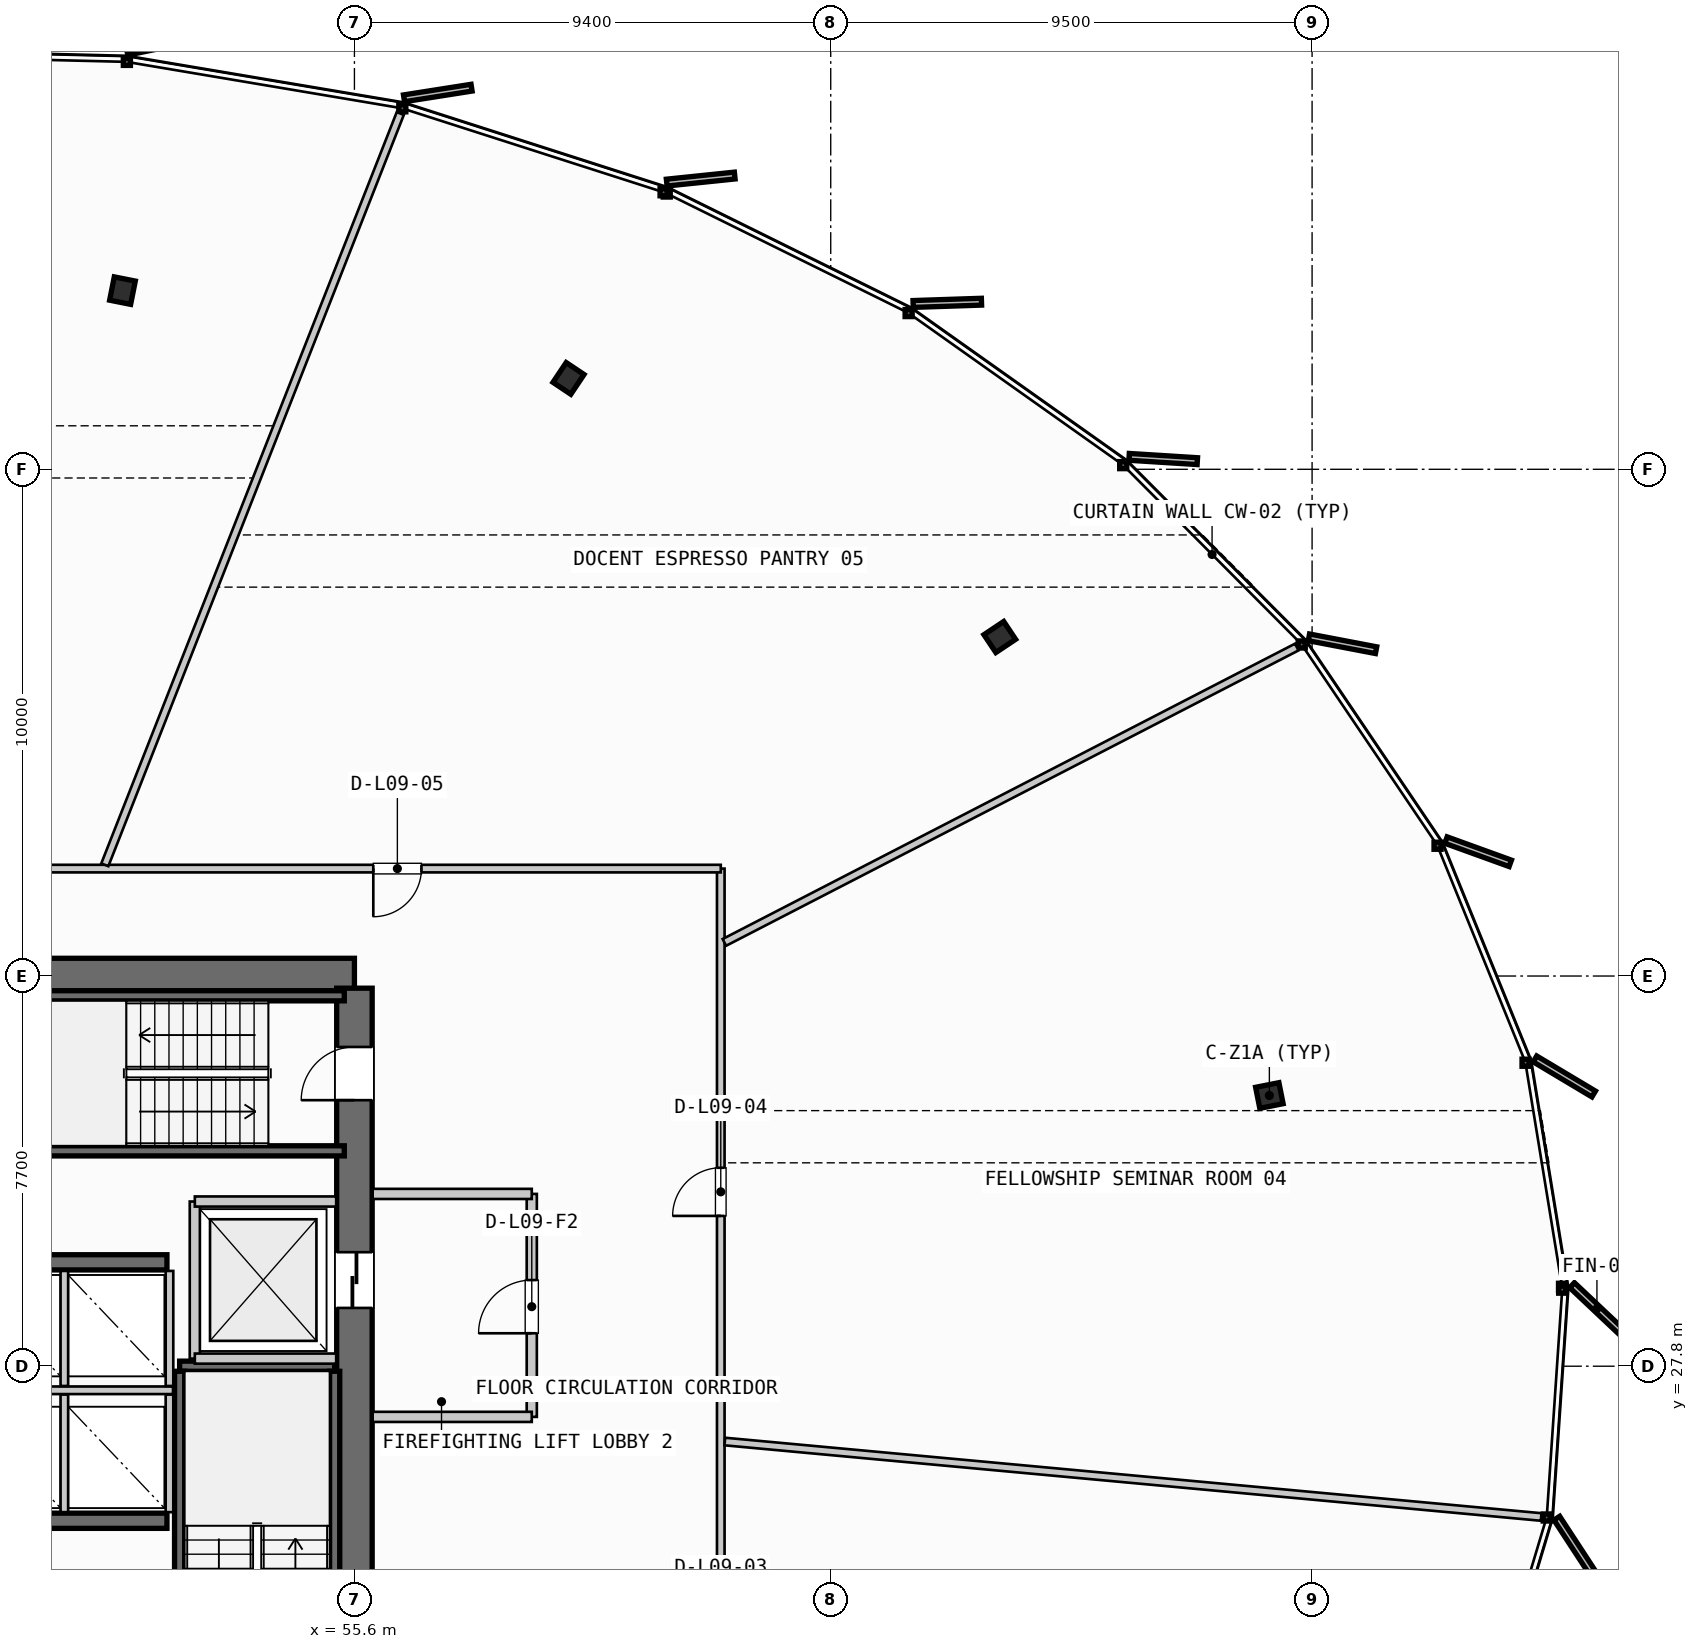
"""IFC4 building model, lengths in metres.
Left out: names, types, materials, properties, quantities, classifications, styles, units other than length and angle.
Written with IfcOpenShell. Run it as: python <this file> out.ifc"""

import sys

from ifc_helpers import new_model, si_unit, direction, frame, frame_2d, origin, origin_2d, place, context, subcontext, project, spatial, rectangle, i_section, extrude, source, transform, mapped, element, fill, save


model = new_model("IFC4")
c1 = context("Model", 3, precision=1e-05, world=origin(), true_north=direction((0.0, 1.0)))
c2 = subcontext(c1, "Body", "Model", "MODEL_VIEW")
j1 = project(units=[si_unit("LENGTHUNIT", "METRE"), si_unit("PLANEANGLEUNIT", "RADIAN")], contexts=[c1])
p1 = place(None, origin())
s1 = spatial("IfcSite", under=j1, at=p1, CompositionType="ELEMENT")
p2 = place(p1, origin())
s2 = spatial("IfcBuilding", under=s1, at=p2, CompositionType="ELEMENT")
p3 = place(p2, frame((0.0, 0.0, 41.0)))
s3 = spatial("IfcBuildingStorey", under=s2, at=p3, CompositionType="ELEMENT", Elevation=41.0)
p4 = place(p3, frame((55.6, 35.5, 0.0), z_axis=(0.0, 0.0, 1.0), x_axis=(-1.0, 0.0, 0.0)))
e1 = element("IfcWall", 1, at=p4, inside=s3, PredefinedType="SHEAR", context=c2, shape_type="SweptSolid", body=[
    extrude(rectangle(XDim=17.6, YDim=0.7, at=frame_2d((8.8, 0.0))), origin(), (0.0, 0.0, 1.0), 3.55),
])
p5 = place(p4, frame((8.05, 0.0, 0.0)))
e2 = element("IfcOpeningElement", 2, at=p5, cuts=e1, PredefinedType="OPENING", context=c2, shape_type="SweptSolid", body=[
    extrude(rectangle(XDim=1.5, YDim=2.2, at=frame_2d((0.75, 1.1))), frame((0.0, 0.36, 0.0), z_axis=(0.0, -1.0, 0.0), x_axis=(1.0, 0.0, 0.0)), (0.0, 0.0, 1.0), 0.72),
])
p6 = place(p4, frame((14.95, 0.0, 0.0)))
e3 = element("IfcOpeningElement", 3, at=p6, cuts=e1, PredefinedType="OPENING", context=c2, shape_type="SweptSolid", body=[
    extrude(rectangle(XDim=1.4, YDim=2.3, at=frame_2d((0.7, 1.15))), frame((0.0, 0.36, 0.0), z_axis=(0.0, -1.0, 0.0), x_axis=(1.0, 0.0, 0.0)), (0.0, 0.0, 1.0), 0.72),
])
p7 = place(p4, frame((12.9, 0.0, 0.0)))
e4 = element("IfcOpeningElement", 4, at=p7, cuts=e1, PredefinedType="OPENING", context=c2, shape_type="SweptSolid", body=[
    extrude(rectangle(XDim=0.9, YDim=2.15, at=frame_2d((0.45, 1.075))), frame((0.0, 0.36, 0.0), z_axis=(0.0, -1.0, 0.0), x_axis=(1.0, 0.0, 0.0)), (0.0, 0.0, 1.0), 0.72),
])
p8 = place(p4, frame((10.6, 0.0, 0.0)))
e5 = element("IfcOpeningElement", 5, at=p8, cuts=e1, PredefinedType="OPENING", context=c2, shape_type="SweptSolid", body=[
    extrude(rectangle(XDim=0.95, YDim=2.15, at=frame_2d((0.475, 1.075))), frame((0.0, 0.36, 0.0), z_axis=(0.0, -1.0, 0.0), x_axis=(1.0, 0.0, 0.0)), (0.0, 0.0, 1.0), 0.72),
])
p9 = place(p3, frame((55.6, 20.34, 0.0), z_axis=(0.0, 0.0, 1.0), x_axis=(0.0, 1.0, 0.0)))
e6 = element("IfcWall", 6, at=p9, inside=s3, PredefinedType="SHEAR", context=c2, shape_type="SweptSolid", body=[
    extrude(rectangle(XDim=14.92, YDim=0.7, at=frame_2d((7.46, 0.0))), origin(), (0.0, 0.0, 1.0), 3.55),
])
p10 = place(p9, frame((12.71, 0.0, 0.0)))
e7 = element("IfcOpeningElement", 7, at=p10, cuts=e6, PredefinedType="OPENING", context=c2, shape_type="SweptSolid", body=[
    extrude(rectangle(XDim=1.05, YDim=2.15, at=frame_2d((0.525, 1.075))), frame((0.0, 0.36, 0.0), z_axis=(0.0, -1.0, 0.0), x_axis=(1.0, 0.0, 0.0)), (0.0, 0.0, 1.0), 0.72),
])
p11 = place(p9, frame((8.61, 0.0, 0.0)))
e8 = element("IfcOpeningElement", 8, at=p11, cuts=e6, PredefinedType="OPENING", context=c2, shape_type="SweptSolid", body=[
    extrude(rectangle(XDim=1.1, YDim=2.2, at=frame_2d((0.55, 1.1))), frame((0.0, 0.36, 0.0), z_axis=(0.0, -1.0, 0.0), x_axis=(1.0, 0.0, 0.0)), (0.0, 0.0, 1.0), 0.72),
])
for number, where, z_axis, x_axis in (
    (9, (47.65, 24.75, 0.0), (0.0, 0.0, 1.0), (1.0, 0.0, 0.0)),
    (10, (47.65, 29.85, 0.0), (0.0, 0.0, 1.0), (1.0, 0.0, 0.0)),
):
    element("IfcWall", number, at=place(p3, frame(where, z_axis=z_axis, x_axis=x_axis)), inside=s3, PredefinedType="SHEAR", context=c2, shape_type="SweptSolid", body=[
        extrude(rectangle(XDim=4.25, YDim=0.3, at=frame_2d((2.125, 0.0))), origin(), (0.0, 0.0, 1.0), 3.55),
    ])
m1 = source(origin(), c2, "Body", "SweptSolid", [
    extrude(i_section(OverallWidth=0.423, OverallDepth=0.469, WebThickness=0.051, FlangeThickness=0.081, FilletRadius=0.015, at=origin_2d()), origin(), (0.0, 0.0, 1.0), 3.55),
])
for number, where, z_axis, x_axis in (
    (11, (73.657, 33.142, 0.0), (0.0, 0.0, 1.0), (0.981, 0.195, 0.0)),
    (12, (68.336, 42.19, 0.0), (0.0, 0.0, 1.0), (0.831, 0.556, 0.0)),
    (13, (59.825, 47.293, 0.0), (0.0, 0.0, 1.0), (0.556, 0.831, 0.0)),
    (14, (51.022, 49.026, 0.0), (0.0, 0.0, 1.0), (0.195, 0.981, 0.0)),
):
    element("IfcColumn", number, at=place(p3, frame(where, z_axis=z_axis, x_axis=x_axis)), inside=s3, PredefinedType="COLUMN", context=c2, shape_type="MappedRepresentation", body=[
        mapped(m1, transform((0.0, 0.0, 0.0), scale=1.0)),
    ])
p12 = place(p3, frame((52.15, 27.8, 0.0), z_axis=(0.0, 0.0, 1.0), x_axis=(1.0, 0.0, 0.0)))
e15 = element("IfcWall", 15, at=p12, inside=s3, PredefinedType="SHEAR", context=c2, shape_type="SweptSolid", body=[
    extrude(rectangle(XDim=3.06, YDim=0.2, at=frame_2d((1.53, 0.0))), origin(), (0.0, 0.0, 1.0), 3.55),
])
for number, where, z_axis, x_axis in (
    (16, (55.21, 27.7, 0.0), (0.0, 0.0, 1.0), (0.0, -1.0, 0.0)),
    (17, (52.15, 20.35, 0.0), (0.0, 0.0, 1.0), (0.0, 1.0, 0.0)),
    (18, (48.05, 35.11, 0.0), (0.0, 0.0, 1.0), (1.0, 0.0, 0.0)),
    (19, (55.4, 32.05, 0.0), (0.0, 0.0, 1.0), (-1.0, 0.0, 0.0)),
):
    element("IfcWall", number, at=place(p3, frame(where, z_axis=z_axis, x_axis=x_axis)), inside=s3, PredefinedType="SHEAR", context=c2, shape_type="SweptSolid", body=[
        extrude(rectangle(XDim=7.35, YDim=0.2, at=frame_2d((3.675, 0.0))), origin(), (0.0, 0.0, 1.0), 3.55),
    ])
p13 = place(p3, frame((52.45, 27.95, 0.0), z_axis=(0.0, 0.0, 1.0), x_axis=(0.0, 1.0, 0.0)))
e20 = element("IfcWall", 20, at=p13, inside=s3, PredefinedType="PARTITIONING", context=c2, shape_type="SweptSolid", body=[
    extrude(rectangle(XDim=3.1, YDim=0.2, at=frame_2d((1.55, 0.0))), origin(), (0.0, 0.0, 1.0), 2.785),
])
for number, where, z_axis, x_axis in (
    (21, (52.45, 27.95, 0.0), (0.0, 0.0, 1.0), (1.0, 0.0, 0.0)),
    (22, (52.45, 31.05, 0.0), (0.0, 0.0, 1.0), (1.0, 0.0, 0.0)),
):
    element("IfcWall", number, at=place(p3, frame(where, z_axis=z_axis, x_axis=x_axis)), inside=s3, PredefinedType="PARTITIONING", context=c2, shape_type="SweptSolid", body=[
        extrude(rectangle(XDim=2.79, YDim=0.2, at=frame_2d((1.395, 0.0))), origin(), (0.0, 0.0, 1.0), 2.785),
    ])
p14 = place(p3, frame((59.1, 26.8, 0.0), z_axis=(0.0, 0.0, 1.0), x_axis=(0.0, 1.0, 0.0)))
e23 = element("IfcWall", 23, at=p14, inside=s3, PredefinedType="PARTITIONING", context=c2, shape_type="SweptSolid", body=[
    extrude(rectangle(XDim=4.4, YDim=0.2, at=frame_2d((2.2, 0.0))), origin(), (0.0, 0.0, 1.0), 2.785),
])
p15 = place(p14, frame((1.65, 0.0, 0.0)))
e24 = element("IfcOpeningElement", 24, at=p15, cuts=e23, PredefinedType="OPENING", context=c2, shape_type="SweptSolid", body=[
    extrude(rectangle(XDim=1.05, YDim=2.15, at=frame_2d((0.525, 1.075))), frame((0.0, 0.11, 0.0), z_axis=(0.0, -1.0, 0.0), x_axis=(1.0, 0.0, 0.0)), (0.0, 0.0, 1.0), 0.22),
])
for number, where, z_axis, x_axis in (
    (25, (55.96, 26.8, 0.0), (0.0, 0.0, 1.0), (1.0, 0.0, 0.0)),
    (26, (55.96, 31.2, 0.0), (0.0, 0.0, 1.0), (1.0, 0.0, 0.0)),
):
    element("IfcWall", number, at=place(p3, frame(where, z_axis=z_axis, x_axis=x_axis)), inside=s3, PredefinedType="PARTITIONING", context=c2, shape_type="SweptSolid", body=[
        extrude(rectangle(XDim=3.14, YDim=0.2, at=frame_2d((1.57, 0.0))), origin(), (0.0, 0.0, 1.0), 2.785),
    ])
p16 = place(p3, frame((47.7, 27.325, 0.0), z_axis=(0.0, 0.0, 1.0), x_axis=(1.0, 0.0, 0.0)))
e27 = element("IfcWall", 27, at=p16, inside=s3, PredefinedType="PARTITIONING", context=c2, shape_type="SweptSolid", body=[
    extrude(rectangle(XDim=4.32, YDim=0.15, at=frame_2d((2.16, 0.0))), origin(), (0.0, 0.0, 1.0), 2.785),
])
for number, where, z_axis, x_axis in (
    (28, (49.875, 24.92, 0.0), (0.0, 0.0, 1.0), (0.0, 1.0, 0.0)),
    (29, (51.95, 24.92, 0.0), (0.0, 0.0, 1.0), (0.0, 1.0, 0.0)),
):
    element("IfcWall", number, at=place(p3, frame(where, z_axis=z_axis, x_axis=x_axis)), inside=s3, PredefinedType="PARTITIONING", context=c2, shape_type="SweptSolid", body=[
        extrude(rectangle(XDim=2.32, YDim=0.15, at=frame_2d((1.16, 0.0))), origin(), (0.0, 0.0, 1.0), 2.785),
    ])
for number, where, z_axis, x_axis in (
    (30, (49.875, 27.41, 0.0), (0.0, 0.0, 1.0), (0.0, 1.0, 0.0)),
    (31, (51.95, 27.41, 0.0), (0.0, 0.0, 1.0), (0.0, 1.0, 0.0)),
):
    element("IfcWall", number, at=place(p3, frame(where, z_axis=z_axis, x_axis=x_axis)), inside=s3, PredefinedType="PARTITIONING", context=c2, shape_type="SweptSolid", body=[
        extrude(rectangle(XDim=2.27, YDim=0.15, at=frame_2d((1.135, 0.0))), origin(), (0.0, 0.0, 1.0), 2.785),
    ])
p17 = place(p3, frame((62.83, 17.14, 0.0), z_axis=(0.0, 0.0, 1.0), x_axis=(0.0, 1.0, 0.0)))
e32 = element("IfcWall", 32, at=p17, inside=s3, PredefinedType="PARTITIONING", context=c2, shape_type="SweptSolid", body=[
    extrude(rectangle(XDim=20.48, YDim=0.15, at=frame_2d((10.24, 0.0))), origin(), (0.0, 0.0, 1.0), 2.785),
])
p18 = place(p17, frame((4.56, 0.0, 0.0)))
e33 = element("IfcOpeningElement", 33, at=p18, cuts=e32, PredefinedType="OPENING", context=c2, shape_type="SweptSolid", body=[
    extrude(rectangle(XDim=0.95, YDim=2.15, at=frame_2d((0.475, 1.075))), frame((0.0, 0.085, 0.0), z_axis=(0.0, -1.0, 0.0), x_axis=(1.0, 0.0, 0.0)), (0.0, 0.0, 1.0), 0.17),
])
p19 = place(p17, frame((13.626, 0.0, 0.0)))
e34 = element("IfcOpeningElement", 34, at=p19, cuts=e32, PredefinedType="OPENING", context=c2, shape_type="SweptSolid", body=[
    extrude(rectangle(XDim=0.95, YDim=2.15, at=frame_2d((0.475, 1.075))), frame((0.0, 0.085, 0.0), z_axis=(0.0, -1.0, 0.0), x_axis=(1.0, 0.0, 0.0)), (0.0, 0.0, 1.0), 0.17),
])
p20 = place(p3, frame((62.83, 37.62, 0.0), z_axis=(0.0, 0.0, 1.0), x_axis=(-1.0, 0.0, 0.0)))
e35 = element("IfcWall", 35, at=p20, inside=s3, PredefinedType="PARTITIONING", context=c2, shape_type="SweptSolid", body=[
    extrude(rectangle(XDim=30.5, YDim=0.15, at=frame_2d((15.25, 0.0))), origin(), (0.0, 0.0, 1.0), 2.785),
])
p21 = place(p20, frame((5.908, 0.0, 0.0)))
e36 = element("IfcOpeningElement", 36, at=p21, cuts=e35, PredefinedType="OPENING", context=c2, shape_type="SweptSolid", body=[
    extrude(rectangle(XDim=0.95, YDim=2.15, at=frame_2d((0.475, 1.075))), frame((0.0, 0.085, 0.0), z_axis=(0.0, -1.0, 0.0), x_axis=(1.0, 0.0, 0.0)), (0.0, 0.0, 1.0), 0.17),
])
p22 = place(p20, frame((19.217, 0.0, 0.0)))
e37 = element("IfcOpeningElement", 37, at=p22, cuts=e35, PredefinedType="OPENING", context=c2, shape_type="SweptSolid", body=[
    extrude(rectangle(XDim=0.95, YDim=2.15, at=frame_2d((0.475, 1.075))), frame((0.0, 0.085, 0.0), z_axis=(0.0, -1.0, 0.0), x_axis=(1.0, 0.0, 0.0)), (0.0, 0.0, 1.0), 0.17),
])
p23 = place(p3, frame((62.91, 26.314, 0.0), z_axis=(0.0, 0.0, 1.0), x_axis=(0.995756410418, -0.092028099575, 0.0)))
e38 = element("IfcWall", 38, at=p23, inside=s3, PredefinedType="PARTITIONING", context=c2, shape_type="SweptSolid", body=[
    extrude(rectangle(XDim=16.18, YDim=0.15, at=frame_2d((8.09, 0.0))), origin(), (0.0, 0.0, 1.0), 2.785),
])
p24 = place(p3, frame((62.901, 36.164, 0.0), z_axis=(0.0, 0.0, 1.0), x_axis=(0.888689580982, 0.458509355034, 0.0)))
e39 = element("IfcWall", 39, at=p24, inside=s3, PredefinedType="PARTITIONING", context=c2, shape_type="SweptSolid", body=[
    extrude(rectangle(XDim=12.712, YDim=0.15, at=frame_2d((6.356, 0.0))), origin(), (0.0, 0.0, 1.0), 2.785),
])
p25 = place(p3, frame((50.674, 37.694, 0.0), z_axis=(0.0, 0.0, 1.0), x_axis=(0.365989434305, 0.930619005811, 0.0)))
e40 = element("IfcWall", 40, at=p25, inside=s3, PredefinedType="PARTITIONING", context=c2, shape_type="SweptSolid", body=[
    extrude(rectangle(XDim=15.932, YDim=0.15, at=frame_2d((7.966, 0.0))), origin(), (0.0, 0.0, 1.0), 2.785),
])
m2 = source(origin(), c2, "Body", "SweptSolid", [
    extrude(rectangle(XDim=1.05, YDim=2.15, at=frame_2d((0.525, 1.075))), frame((0.0, 0.025, 0.0), z_axis=(0.0, -1.0, 0.0), x_axis=(1.0, 0.0, 0.0)), (0.0, 0.0, 1.0), 0.05),
])
p26 = place(p10, origin())
e41 = element("IfcDoor", 41, at=p26, inside=s3, OperationType="SINGLE_SWING_LEFT", PredefinedType="DOOR", context=c2, shape_type="MappedRepresentation", body=[
    mapped(m2, transform((0.0, 0.0, 0.0), scale=1.0)),
])
fill(e7, e41)
m3 = source(origin(), c2, "Body", "SweptSolid", [
    extrude(rectangle(XDim=1.1, YDim=2.2, at=frame_2d((0.55, 1.1))), frame((0.0, 0.025, 0.0), z_axis=(0.0, -1.0, 0.0), x_axis=(1.0, 0.0, 0.0)), (0.0, 0.0, 1.0), 0.05),
])
p27 = place(p11, origin())
e42 = element("IfcDoor", 42, at=p27, inside=s3, OperationType="SLIDING_TO_RIGHT", PredefinedType="DOOR", context=c2, shape_type="MappedRepresentation", body=[
    mapped(m3, transform((0.0, 0.0, 0.0), scale=1.0)),
])
fill(e8, e42)
p28 = place(p15, origin())
e43 = element("IfcDoor", 43, at=p28, inside=s3, OperationType="SINGLE_SWING_LEFT", PredefinedType="DOOR", context=c2, shape_type="MappedRepresentation", body=[
    mapped(m2, transform((0.0, 0.0, 0.0), scale=1.0)),
])
fill(e24, e43)
m4 = source(origin(), c2, "Body", "SweptSolid", [
    extrude(rectangle(XDim=0.95, YDim=2.15, at=frame_2d((0.475, 1.075))), frame((0.0, 0.025, 0.0), z_axis=(0.0, -1.0, 0.0), x_axis=(1.0, 0.0, 0.0)), (0.0, 0.0, 1.0), 0.05),
])
p29 = place(p19, origin())
e44 = element("IfcDoor", 44, at=p29, inside=s3, OperationType="SINGLE_SWING_LEFT", PredefinedType="DOOR", context=c2, shape_type="MappedRepresentation", body=[
    mapped(m4, transform((0.0, 0.0, 0.0), scale=1.0)),
])
fill(e34, e44)
p30 = place(p21, origin())
e45 = element("IfcDoor", 45, at=p30, inside=s3, OperationType="SINGLE_SWING_RIGHT", PredefinedType="DOOR", context=c2, shape_type="MappedRepresentation", body=[
    mapped(m4, transform((0.0, 0.0, 0.0), scale=1.0)),
])
fill(e36, e45)
save(model, sys.argv[1])
